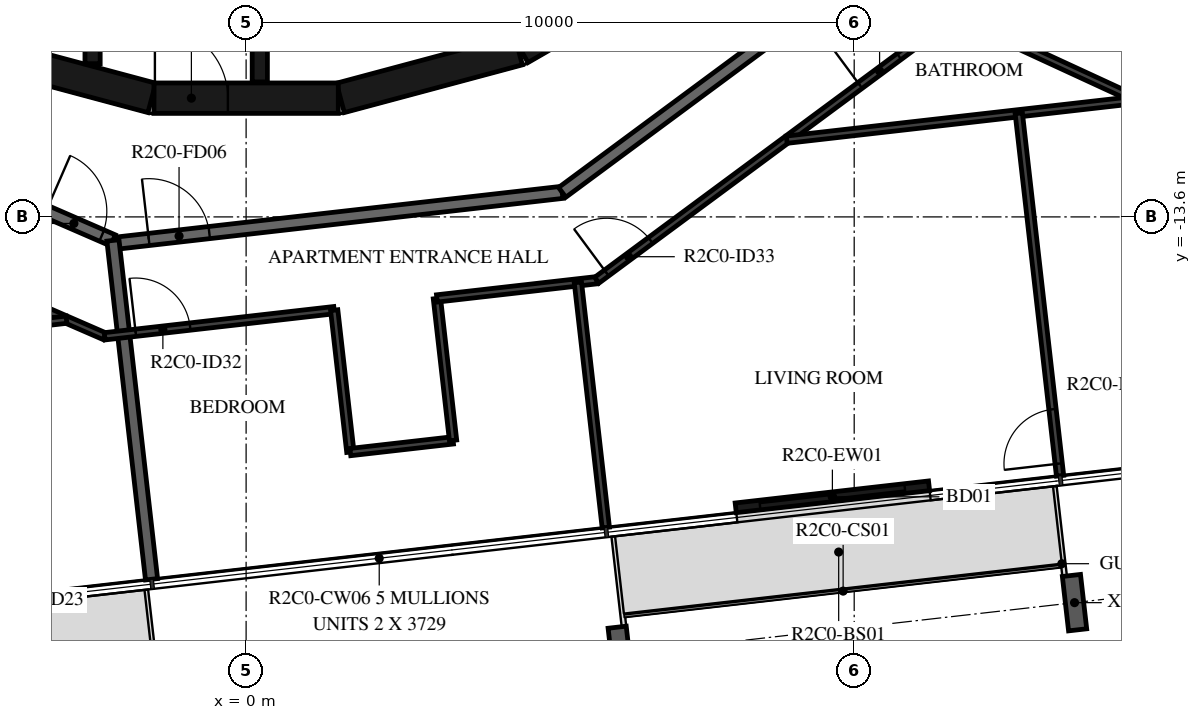
"""IFC4 building model, lengths in metres.
Left out: names, types, materials, properties, quantities, classifications, styles, units other than length and angle.
Written with IfcOpenShell. Run it as: python <this file> out.ifc"""

import sys

from ifc_helpers import new_model, si_unit, direction, frame, frame_2d, origin, origin_2d, place, context, subcontext, project, spatial, rectangle, i_section, extrude, element, fill, save


model = new_model("IFC4")
c1 = context("Model", 3, precision=1e-05, world=origin(), true_north=direction((0.0, 1.0)))
c2 = subcontext(c1, "Body", "Model", "MODEL_VIEW")
j1 = project(units=[si_unit("LENGTHUNIT", "METRE"), si_unit("PLANEANGLEUNIT", "RADIAN")], contexts=[c1])
p1 = place(None, origin())
s1 = spatial("IfcSite", under=j1, at=p1, CompositionType="ELEMENT")
p2 = place(p1, origin())
s2 = spatial("IfcBuilding", under=s1, at=p2, CompositionType="ELEMENT")
p3 = place(p2, frame((0.0, 0.0, 104.7)))
s3 = spatial("IfcBuildingStorey", under=s2, at=p3, CompositionType="ELEMENT", Elevation=104.7)
for number, where, z_axis, x_axis in (
    (1, (6.153, -20.795, -0.38), (0.0, 0.0, 1.0), (-0.994, -0.113, 0.0)),
    (2, (13.624, -19.944, -0.38), (0.0, 0.0, 1.0), (-0.994, -0.113, 0.0)),
):
    element("IfcColumn", number, at=place(p3, frame(where, z_axis=z_axis, x_axis=x_axis)), inside=s3, PredefinedType="COLUMN", context=c2, shape_type="SweptSolid", body=[
        extrude(i_section(OverallWidth=0.3, OverallDepth=0.9, WebThickness=0.019, FlangeThickness=0.035, FilletRadius=0.03, at=origin_2d()), origin(), (0.0, 0.0, 1.0), 2.616),
    ])
p4 = place(p3, frame((8.052, -18.384, 0.0), z_axis=(0.0, 0.0, 1.0), x_axis=(0.993569997097, 0.113219525124, 0.0)))
e3 = element("IfcWall", 3, at=p4, inside=s3, PredefinedType="STANDARD", context=c2, shape_type="SweptSolid", body=[
    extrude(rectangle(XDim=3.2, YDim=0.16, at=frame_2d((1.6, 0.0))), origin(), (0.0, 0.0, 1.0), 3.05),
])
p5 = place(p4, frame((0.4, 0.0, 0.0)))
e4 = element("IfcOpeningElement", 4, at=p5, cuts=e3, PredefinedType="OPENING", context=c2, shape_type="SweptSolid", body=[
    extrude(rectangle(XDim=2.4, YDim=2.4, at=frame_2d((1.2, 1.2))), frame((0.0, 0.09, 0.0), z_axis=(0.0, -1.0, 0.0), x_axis=(1.0, 0.0, 0.0)), (0.0, 0.0, 1.0), 0.18),
])
p6 = place(p3, frame((1.55, -11.643, 0.0), z_axis=(0.0, 0.0, 1.0), x_axis=(0.965948410781, 0.258734743916, 0.0)))
e5 = element("IfcWall", 5, at=p6, inside=s3, PredefinedType="SHEAR", context=c2, shape_type="SweptSolid", body=[
    extrude(rectangle(XDim=3.033, YDim=0.5, at=frame_2d((1.516, 0.0))), origin(), (0.0, 0.0, 1.0), 3.05),
])
p7 = place(p3, frame((4.51, -10.845, 0.0), z_axis=(0.0, 0.0, 1.0), x_axis=(0.865975092491, 0.500087131594, 0.0)))
e6 = element("IfcWall", 6, at=p7, inside=s3, PredefinedType="SHEAR", context=c2, shape_type="SweptSolid", body=[
    extrude(rectangle(XDim=3.033, YDim=0.5, at=frame_2d((1.516, 0.0))), origin(), (0.0, 0.0, 1.0), 3.05),
])
p8 = place(p7, frame((1.066, 0.0, 0.0)))
e7 = element("IfcOpeningElement", 7, at=p8, cuts=e6, PredefinedType="OPENING", context=c2, shape_type="SweptSolid", body=[
    extrude(rectangle(XDim=0.9, YDim=2.1, at=frame_2d((0.45, 1.05))), frame((0.0, 0.26, 0.0), z_axis=(0.0, -1.0, 0.0), x_axis=(1.0, 0.0, 0.0)), (0.0, 0.0, 1.0), 0.52),
])
p9 = place(p3, frame((-4.479, -10.858, 0.0), z_axis=(0.0, 0.0, 1.0), x_axis=(0.965948410781, -0.258734743916, 0.0)))
e8 = element("IfcWall", 8, at=p9, inside=s3, PredefinedType="SHEAR", context=c2, shape_type="SweptSolid", body=[
    extrude(rectangle(XDim=3.033, YDim=0.5, at=frame_2d((1.516, 0.0))), origin(), (0.0, 0.0, 1.0), 3.05),
])
p10 = place(p3, frame((-1.516, -11.647, 0.0), z_axis=(0.0, 0.0, 1.0), x_axis=(1.0, 0.0, 0.0)))
e9 = element("IfcWall", 9, at=p10, inside=s3, PredefinedType="SHEAR", context=c2, shape_type="SweptSolid", body=[
    extrude(rectangle(XDim=3.033, YDim=0.5, at=frame_2d((1.516, 0.0))), origin(), (0.0, 0.0, 1.0), 3.05),
])
p11 = place(p10, frame((0.016, 0.0, 0.0)))
e10 = element("IfcOpeningElement", 10, at=p11, cuts=e9, PredefinedType="OPENING", context=c2, shape_type="SweptSolid", body=[
    extrude(rectangle(XDim=1.2, YDim=2.1, at=frame_2d((0.6, 1.05))), frame((0.0, 0.26, 0.0), z_axis=(0.0, -1.0, 0.0), x_axis=(1.0, 0.0, 0.0)), (0.0, 0.0, 1.0), 0.52),
])
p12 = place(p3, frame((-2.525, -8.97, 0.0), z_axis=(0.0, 0.0, 1.0), x_axis=(0.0, -1.0, 0.0)))
e11 = element("IfcWall", 11, at=p12, inside=s3, PredefinedType="SHEAR", context=c2, shape_type="SweptSolid", body=[
    extrude(rectangle(XDim=2.11, YDim=0.25, at=frame_2d((1.055, 0.0))), origin(), (0.0, 0.0, 1.0), 3.05),
])
p13 = place(p3, frame((0.225, -8.97, 0.0), z_axis=(0.0, 0.0, 1.0), x_axis=(0.0, -1.0, 0.0)))
e12 = element("IfcWall", 12, at=p13, inside=s3, PredefinedType="SHEAR", context=c2, shape_type="SweptSolid", body=[
    extrude(rectangle(XDim=2.41, YDim=0.25, at=frame_2d((1.205, 0.0))), origin(), (0.0, 0.0, 1.0), 3.05),
])
p14 = place(p3, frame((-8.829, -11.1, 0.0), z_axis=(0.0, 0.0, 1.0), x_axis=(0.917063622491, -0.398740908742, 0.0)))
e13 = element("IfcWall", 13, at=p14, inside=s3, PredefinedType="STANDARD", context=c2, shape_type="SweptSolid", body=[
    extrude(rectangle(XDim=7.24, YDim=0.2, at=frame_2d((3.62, 0.0))), origin(), (0.0, 0.0, 1.0), 3.05),
])
p15 = place(p14, frame((6.04, 0.0, 0.0)))
e14 = element("IfcOpeningElement", 14, at=p15, cuts=e13, PredefinedType="OPENING", context=c2, shape_type="SweptSolid", body=[
    extrude(rectangle(XDim=1.0, YDim=2.1, at=frame_2d((0.5, 1.05))), frame((0.0, 0.11, 0.0), z_axis=(0.0, -1.0, 0.0), x_axis=(1.0, 0.0, 0.0)), (0.0, 0.0, 1.0), 0.22),
])
p16 = place(p3, frame((-2.096, -14.028, 0.0), z_axis=(0.0, 0.0, 1.0), x_axis=(0.993569170114, 0.113226782163, 0.0)))
e15 = element("IfcWall", 15, at=p16, inside=s3, PredefinedType="STANDARD", context=c2, shape_type="SweptSolid", body=[
    extrude(rectangle(XDim=7.342, YDim=0.2, at=frame_2d((3.671, 0.0))), origin(), (0.0, 0.0, 1.0), 3.05),
])
p17 = place(p16, frame((0.5, 0.0, 0.0)))
e16 = element("IfcOpeningElement", 16, at=p17, cuts=e15, PredefinedType="OPENING", context=c2, shape_type="SweptSolid", body=[
    extrude(rectangle(XDim=1.0, YDim=2.1, at=frame_2d((0.5, 1.05))), frame((0.0, 0.11, 0.0), z_axis=(0.0, -1.0, 0.0), x_axis=(1.0, 0.0, 0.0)), (0.0, 0.0, 1.0), 0.22),
])
p18 = place(p3, frame((5.198, -13.196, 0.0), z_axis=(0.0, 0.0, 1.0), x_axis=(0.803869883159, 0.594805187394, 0.0)))
e17 = element("IfcWall", 17, at=p18, inside=s3, PredefinedType="STANDARD", context=c2, shape_type="SweptSolid", body=[
    extrude(rectangle(XDim=7.342, YDim=0.2, at=frame_2d((3.671, 0.0))), origin(), (0.0, 0.0, 1.0), 3.05),
])
p19 = place(p3, frame((-1.555, -19.559, 0.0), z_axis=(0.0, 0.0, 1.0), x_axis=(-0.113221250863, 0.993569800443, 0.0)))
e18 = element("IfcWall", 18, at=p19, inside=s3, PredefinedType="STANDARD", context=c2, shape_type="SweptSolid", body=[
    extrude(rectangle(XDim=5.609, YDim=0.2, at=frame_2d((2.804, 0.0))), origin(), (0.0, 0.0, 1.0), 3.05),
])
p20 = place(p3, frame((-9.562, -12.417, 0.0), z_axis=(0.0, 0.0, 1.0), x_axis=(0.917063169851, -0.398741949767, 0.0)))
e19 = element("IfcWall", 19, at=p20, inside=s3, PredefinedType="PARTITIONING", context=c2, shape_type="SweptSolid", body=[
    extrude(rectangle(XDim=7.891, YDim=0.12, at=frame_2d((3.946, 0.0))), origin(), (0.0, 0.0, 1.0), 3.05),
])
p21 = place(p20, frame((0.715, 0.0, 0.0)))
e20 = element("IfcOpeningElement", 20, at=p21, cuts=e19, PredefinedType="OPENING", context=c2, shape_type="SweptSolid", body=[
    extrude(rectangle(XDim=0.8, YDim=2.1, at=frame_2d((0.4, 1.05))), frame((0.0, 0.07, 0.0), z_axis=(0.0, -1.0, 0.0), x_axis=(1.0, 0.0, 0.0)), (0.0, 0.0, 1.0), 0.14),
])
p22 = place(p3, frame((-2.326, -15.563, 0.0), z_axis=(0.0, 0.0, 1.0), x_axis=(0.993575068384, 0.113175012641, 0.0)))
e21 = element("IfcWall", 21, at=p22, inside=s3, PredefinedType="PARTITIONING", context=c2, shape_type="SweptSolid", body=[
    extrude(rectangle(XDim=3.799, YDim=0.12, at=frame_2d((1.899, 0.0))), origin(), (0.0, 0.0, 1.0), 3.05),
])
p23 = place(p22, frame((0.513, 0.0, 0.0)))
e22 = element("IfcOpeningElement", 22, at=p23, cuts=e21, PredefinedType="OPENING", context=c2, shape_type="SweptSolid", body=[
    extrude(rectangle(XDim=0.9, YDim=2.1, at=frame_2d((0.45, 1.05))), frame((0.0, 0.07, 0.0), z_axis=(0.0, -1.0, 0.0), x_axis=(1.0, 0.0, 0.0)), (0.0, 0.0, 1.0), 0.14),
])
p24 = place(p3, frame((-17.437, -16.94, 0.0), z_axis=(0.0, 0.0, 1.0), x_axis=(0.993573314119, 0.113190412448, 0.0)))
e23 = element("IfcWall", 23, at=p24, inside=s3, PredefinedType="PARTITIONING", context=c2, shape_type="SweptSolid", body=[
    extrude(rectangle(XDim=14.576, YDim=0.12, at=frame_2d((7.288, 0.0))), origin(), (0.0, 0.0, 1.0), 3.05),
])
p25 = place(p24, frame((3.201, 0.0, 0.0)))
e24 = element("IfcOpeningElement", 24, at=p25, cuts=e23, PredefinedType="OPENING", context=c2, shape_type="SweptSolid", body=[
    extrude(rectangle(XDim=0.9, YDim=2.1, at=frame_2d((0.45, 1.05))), frame((0.0, 0.07, 0.0), z_axis=(0.0, -1.0, 0.0), x_axis=(1.0, 0.0, 0.0)), (0.0, 0.0, 1.0), 0.14),
])
p26 = place(p24, frame((5.985, 0.0, 0.0)))
e25 = element("IfcOpeningElement", 25, at=p26, cuts=e23, PredefinedType="OPENING", context=c2, shape_type="SweptSolid", body=[
    extrude(rectangle(XDim=0.9, YDim=2.1, at=frame_2d((0.45, 1.05))), frame((0.0, 0.07, 0.0), z_axis=(0.0, -1.0, 0.0), x_axis=(1.0, 0.0, 0.0)), (0.0, 0.0, 1.0), 0.14),
])
p27 = place(p3, frame((1.448, -15.133, 0.0), z_axis=(0.0, 0.0, 1.0), x_axis=(0.113180189053, -0.993574478741, 0.0)))
e26 = element("IfcWall", 26, at=p27, inside=s3, PredefinedType="PARTITIONING", context=c2, shape_type="SweptSolid", body=[
    extrude(rectangle(XDim=2.349, YDim=0.12, at=frame_2d((1.175, 0.0))), origin(), (0.0, 0.0, 1.0), 3.05),
])
p28 = place(p3, frame((1.714, -17.467, 0.0), z_axis=(0.0, 0.0, 1.0), x_axis=(0.993577030812, 0.113157782957, 0.0)))
e27 = element("IfcWall", 27, at=p28, inside=s3, PredefinedType="PARTITIONING", context=c2, shape_type="SweptSolid", body=[
    extrude(rectangle(XDim=1.7, YDim=0.12, at=frame_2d((0.85, 0.0))), origin(), (0.0, 0.0, 1.0), 3.05),
])
p29 = place(p3, frame((3.404, -17.275, 0.0), z_axis=(0.0, 0.0, 1.0), x_axis=(-0.113180189053, 0.993574478741, 0.0)))
e28 = element("IfcWall", 28, at=p29, inside=s3, PredefinedType="PARTITIONING", context=c2, shape_type="SweptSolid", body=[
    extrude(rectangle(XDim=2.349, YDim=0.12, at=frame_2d((1.175, 0.0))), origin(), (0.0, 0.0, 1.0), 3.05),
])
p30 = place(p3, frame((3.138, -14.941, 0.0), z_axis=(0.0, 0.0, 1.0), x_axis=(0.99356355736, 0.113276023437, 0.0)))
e29 = element("IfcWall", 29, at=p30, inside=s3, PredefinedType="PARTITIONING", context=c2, shape_type="SweptSolid", body=[
    extrude(rectangle(XDim=2.647, YDim=0.12, at=frame_2d((1.323, 0.0))), origin(), (0.0, 0.0, 1.0), 3.05),
])
p31 = place(p3, frame((5.767, -14.641, 0.0), z_axis=(0.0, 0.0, 1.0), x_axis=(0.803867427863, 0.594808505673, 0.0)))
e30 = element("IfcWall", 30, at=p31, inside=s3, PredefinedType="PARTITIONING", context=c2, shape_type="SweptSolid", body=[
    extrude(rectangle(XDim=7.316, YDim=0.12, at=frame_2d((3.658, 0.0))), origin(), (0.0, 0.0, 1.0), 3.05),
])
p32 = place(p31, frame((0.2, 0.0, 0.0)))
e31 = element("IfcOpeningElement", 31, at=p32, cuts=e30, PredefinedType="OPENING", context=c2, shape_type="SweptSolid", body=[
    extrude(rectangle(XDim=0.9, YDim=2.1, at=frame_2d((0.45, 1.05))), frame((0.0, 0.07, 0.0), z_axis=(0.0, -1.0, 0.0), x_axis=(1.0, 0.0, 0.0)), (0.0, 0.0, 1.0), 0.14),
])
p33 = place(p31, frame((5.385, 0.0, 0.0)))
e32 = element("IfcOpeningElement", 32, at=p33, cuts=e30, PredefinedType="OPENING", context=c2, shape_type="SweptSolid", body=[
    extrude(rectangle(XDim=0.8, YDim=2.1, at=frame_2d((0.4, 1.05))), frame((0.0, 0.07, 0.0), z_axis=(0.0, -1.0, 0.0), x_axis=(1.0, 0.0, 0.0)), (0.0, 0.0, 1.0), 0.14),
])
p34 = place(p3, frame((11.649, -10.289, 0.0), z_axis=(0.0, 0.0, 1.0), x_axis=(0.9079269461, -0.419128453514, 0.0)))
e33 = element("IfcWall", 33, at=p34, inside=s3, PredefinedType="PARTITIONING", context=c2, shape_type="SweptSolid", body=[
    extrude(rectangle(XDim=3.304, YDim=0.12, at=frame_2d((1.652, 0.0))), origin(), (0.0, 0.0, 1.0), 3.05),
])
p35 = place(p3, frame((5.915, -18.708, 0.0), z_axis=(0.0, 0.0, 1.0), x_axis=(-0.113244511591, 0.993567149515, 0.0)))
e34 = element("IfcWall", 34, at=p35, inside=s3, PredefinedType="PARTITIONING", context=c2, shape_type="SweptSolid", body=[
    extrude(rectangle(XDim=4.057, YDim=0.12, at=frame_2d((2.029, 0.0))), origin(), (0.0, 0.0, 1.0), 3.05),
])
p36 = place(p3, frame((14.649, -11.674, 0.0), z_axis=(0.0, 0.0, 1.0), x_axis=(-0.993573746873, -0.113186613721, 0.0)))
e35 = element("IfcWall", 35, at=p36, inside=s3, PredefinedType="PARTITIONING", context=c2, shape_type="SweptSolid", body=[
    extrude(rectangle(XDim=5.796, YDim=0.12, at=frame_2d((2.898, 0.0))), origin(), (0.0, 0.0, 1.0), 3.05),
])
p37 = place(p3, frame((13.386, -17.857, 0.0), z_axis=(0.0, 0.0, 1.0), x_axis=(-0.113200012983, 0.993572220355, 0.0)))
e36 = element("IfcWall", 36, at=p37, inside=s3, PredefinedType="PARTITIONING", context=c2, shape_type="SweptSolid", body=[
    extrude(rectangle(XDim=6.0, YDim=0.12, at=frame_2d((3.0, 0.0))), origin(), (0.0, 0.0, 1.0), 3.05),
])
p38 = place(p37, frame((0.2, 0.0, 0.0)))
e37 = element("IfcOpeningElement", 37, at=p38, cuts=e36, PredefinedType="OPENING", context=c2, shape_type="SweptSolid", body=[
    extrude(rectangle(XDim=0.9, YDim=2.1, at=frame_2d((0.45, 1.05))), frame((0.0, 0.07, 0.0), z_axis=(0.0, -1.0, 0.0), x_axis=(1.0, 0.0, 0.0)), (0.0, 0.0, 1.0), 0.14),
])
p39 = place(p5, origin())
e38 = element("IfcDoor", 38, at=p39, inside=s3, OperationType="DOUBLE_DOOR_SLIDING", PredefinedType="DOOR", context=c2, shape_type="SweptSolid", body=[
    extrude(rectangle(XDim=2.4, YDim=2.4, at=frame_2d((1.2, 1.2))), frame((0.0, 0.025, 0.0), z_axis=(0.0, -1.0, 0.0), x_axis=(1.0, 0.0, 0.0)), (0.0, 0.0, 1.0), 0.05),
])
fill(e4, e38)
p40 = place(p11, origin())
e39 = element("IfcDoor", 39, at=p40, inside=s3, OperationType="SINGLE_SWING_RIGHT", PredefinedType="DOOR", context=c2, shape_type="SweptSolid", body=[
    extrude(rectangle(XDim=1.2, YDim=2.1, at=frame_2d((0.6, 1.05))), frame((0.0, 0.025, 0.0), z_axis=(0.0, -1.0, 0.0), x_axis=(1.0, 0.0, 0.0)), (0.0, 0.0, 1.0), 0.05),
])
fill(e10, e39)
p41 = place(p15, origin())
e40 = element("IfcDoor", 40, at=p41, inside=s3, OperationType="SINGLE_SWING_LEFT", PredefinedType="DOOR", context=c2, shape_type="SweptSolid", body=[
    extrude(rectangle(XDim=1.0, YDim=2.1, at=frame_2d((0.5, 1.05))), frame((0.0, 0.025, 0.0), z_axis=(0.0, -1.0, 0.0), x_axis=(1.0, 0.0, 0.0)), (0.0, 0.0, 1.0), 0.05),
])
fill(e14, e40)
p42 = place(p17, origin())
e41 = element("IfcDoor", 41, at=p42, inside=s3, OperationType="SINGLE_SWING_LEFT", PredefinedType="DOOR", context=c2, shape_type="SweptSolid", body=[
    extrude(rectangle(XDim=1.0, YDim=2.1, at=frame_2d((0.5, 1.05))), frame((0.0, 0.025, 0.0), z_axis=(0.0, -1.0, 0.0), x_axis=(1.0, 0.0, 0.0)), (0.0, 0.0, 1.0), 0.05),
])
fill(e16, e41)
p43 = place(p23, origin())
e42 = element("IfcDoor", 42, at=p43, inside=s3, OperationType="SINGLE_SWING_LEFT", PredefinedType="DOOR", context=c2, shape_type="SweptSolid", body=[
    extrude(rectangle(XDim=0.9, YDim=2.1, at=frame_2d((0.45, 1.05))), frame((0.0, 0.025, 0.0), z_axis=(0.0, -1.0, 0.0), x_axis=(1.0, 0.0, 0.0)), (0.0, 0.0, 1.0), 0.05),
])
fill(e22, e42)
p44 = place(p32, origin())
e43 = element("IfcDoor", 43, at=p44, inside=s3, OperationType="SINGLE_SWING_RIGHT", PredefinedType="DOOR", context=c2, shape_type="SweptSolid", body=[
    extrude(rectangle(XDim=0.9, YDim=2.1, at=frame_2d((0.45, 1.05))), frame((0.0, 0.025, 0.0), z_axis=(0.0, -1.0, 0.0), x_axis=(1.0, 0.0, 0.0)), (0.0, 0.0, 1.0), 0.05),
])
fill(e31, e43)
p45 = place(p33, origin())
e44 = element("IfcDoor", 44, at=p45, inside=s3, OperationType="SINGLE_SWING_RIGHT", PredefinedType="DOOR", context=c2, shape_type="SweptSolid", body=[
    extrude(rectangle(XDim=0.8, YDim=2.1, at=frame_2d((0.4, 1.05))), frame((0.0, 0.025, 0.0), z_axis=(0.0, -1.0, 0.0), x_axis=(1.0, 0.0, 0.0)), (0.0, 0.0, 1.0), 0.05),
])
fill(e32, e44)
p46 = place(p38, origin())
e45 = element("IfcDoor", 45, at=p46, inside=s3, OperationType="SINGLE_SWING_RIGHT", PredefinedType="DOOR", context=c2, shape_type="SweptSolid", body=[
    extrude(rectangle(XDim=0.9, YDim=2.1, at=frame_2d((0.45, 1.05))), frame((0.0, 0.025, 0.0), z_axis=(0.0, -1.0, 0.0), x_axis=(1.0, 0.0, 0.0)), (0.0, 0.0, 1.0), 0.05),
])
fill(e37, e45)
save(model, sys.argv[1])
